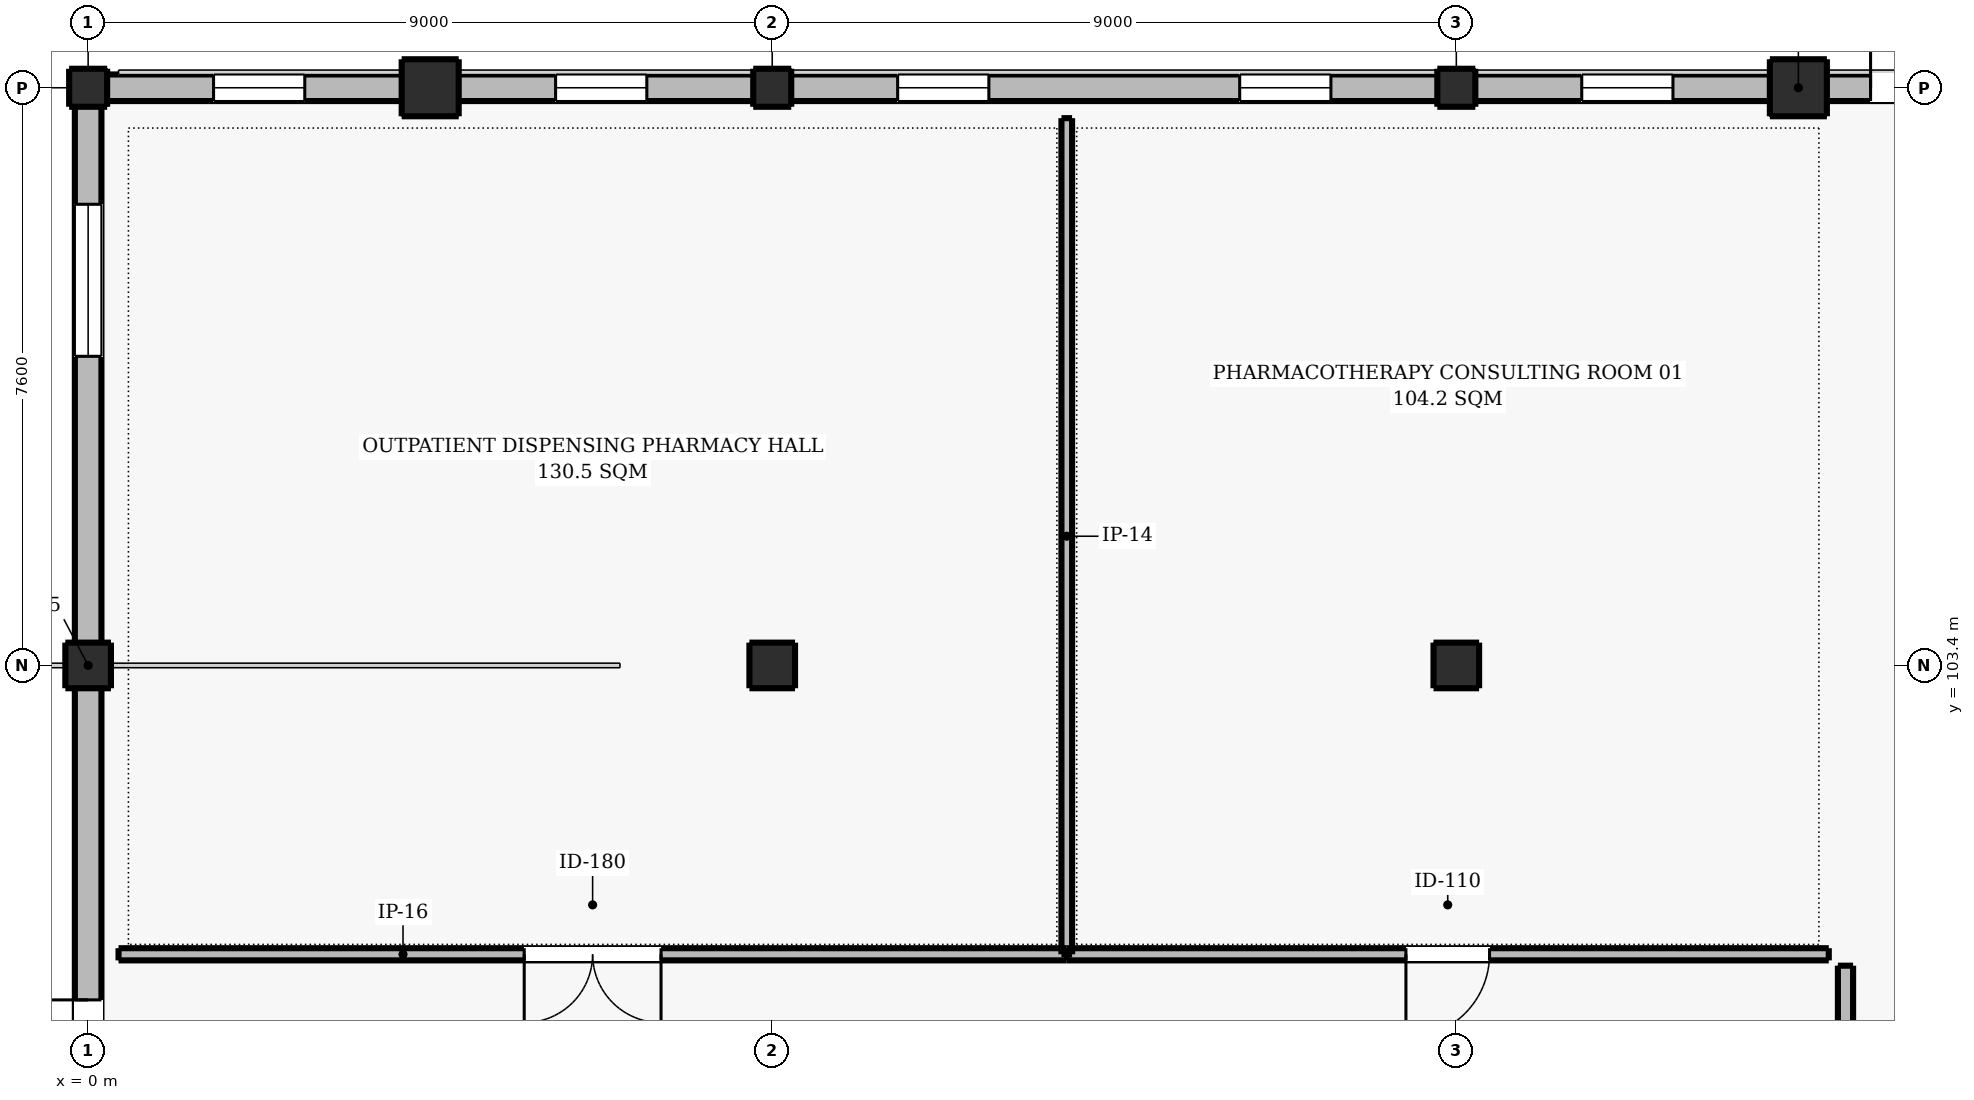
"""IFC4 building model, lengths in metres.
Left out: names, types, materials, properties, quantities, classifications, styles, units other than length and angle.
Written with IfcOpenShell. Run it as: python <this file> out.ifc"""

import sys

from ifc_helpers import new_model, si_unit, direction, frame, frame_2d, origin, origin_2d, place, context, subcontext, project, spatial, rectangle, circle, extrude, element, fill, save


model = new_model("IFC4")
c1 = context("Model", 3, precision=1e-05, world=origin(), true_north=direction((0.0, 1.0)))
c2 = subcontext(c1, "Body", "Model", "MODEL_VIEW")
j1 = project(units=[si_unit("LENGTHUNIT", "METRE"), si_unit("PLANEANGLEUNIT", "RADIAN")], contexts=[c1])
p1 = place(None, origin())
s1 = spatial("IfcSite", under=j1, at=p1, CompositionType="ELEMENT")
p2 = place(p1, origin())
s2 = spatial("IfcBuilding", under=s1, at=p2, CompositionType="ELEMENT")
p3 = place(p2, origin())
s3 = spatial("IfcBuildingStorey", under=s2, at=p3, CompositionType="ELEMENT", Elevation=0.0)
p4 = place(p3, frame((0.0, 103.4, 0.0), z_axis=(0.0, 0.0, 1.0), x_axis=(1.0, 0.0, 0.0)))
e1 = element("IfcColumn", 1, at=p4, inside=s3, PredefinedType="COLUMN", context=c2, shape_type="SweptSolid", body=[
    extrude(rectangle(XDim=0.6, YDim=0.6, at=origin_2d()), origin(), (0.0, 0.0, 1.0), 5.1),
])
p5 = place(p3, frame((0.0, 111.0, 0.0), z_axis=(0.0, 0.0, 1.0), x_axis=(1.0, 0.0, 0.0)))
e2 = element("IfcColumn", 2, at=p5, inside=s3, PredefinedType="COLUMN", context=c2, shape_type="SweptSolid", body=[
    extrude(circle(Radius=0.35, at=origin_2d()), origin(), (0.0, 0.0, 1.0), 5.1),
])
p6 = place(p3, frame((4.5, 111.0, 0.0), z_axis=(0.0, 0.0, 1.0), x_axis=(1.0, 0.0, 0.0)))
e3 = element("IfcColumn", 3, at=p6, inside=s3, PredefinedType="PILASTER", context=c2, shape_type="SweptSolid", body=[
    extrude(rectangle(XDim=0.75, YDim=0.75, at=origin_2d()), origin(), (0.0, 0.0, 1.0), 5.1),
])
p7 = place(p3, frame((9.0, 103.4, 0.0), z_axis=(0.0, 0.0, 1.0), x_axis=(1.0, 0.0, 0.0)))
e4 = element("IfcColumn", 4, at=p7, inside=s3, PredefinedType="COLUMN", context=c2, shape_type="SweptSolid", body=[
    extrude(rectangle(XDim=0.6, YDim=0.6, at=origin_2d()), origin(), (0.0, 0.0, 1.0), 5.1),
])
p8 = place(p3, frame((9.0, 111.0, 0.0), z_axis=(0.0, 0.0, 1.0), x_axis=(1.0, 0.0, 0.0)))
e5 = element("IfcColumn", 5, at=p8, inside=s3, PredefinedType="COLUMN", context=c2, shape_type="SweptSolid", body=[
    extrude(circle(Radius=0.35, at=origin_2d()), origin(), (0.0, 0.0, 1.0), 5.1),
])
p9 = place(p3, frame((18.0, 103.4, 0.0), z_axis=(0.0, 0.0, 1.0), x_axis=(1.0, 0.0, 0.0)))
e6 = element("IfcColumn", 6, at=p9, inside=s3, PredefinedType="COLUMN", context=c2, shape_type="SweptSolid", body=[
    extrude(rectangle(XDim=0.6, YDim=0.6, at=origin_2d()), origin(), (0.0, 0.0, 1.0), 5.1),
])
p10 = place(p3, frame((18.0, 111.0, 0.0), z_axis=(0.0, 0.0, 1.0), x_axis=(1.0, 0.0, 0.0)))
e7 = element("IfcColumn", 7, at=p10, inside=s3, PredefinedType="COLUMN", context=c2, shape_type="SweptSolid", body=[
    extrude(circle(Radius=0.35, at=origin_2d()), origin(), (0.0, 0.0, 1.0), 5.1),
])
p11 = place(p3, frame((22.5, 111.0, 0.0), z_axis=(0.0, 0.0, 1.0), x_axis=(1.0, 0.0, 0.0)))
e8 = element("IfcColumn", 8, at=p11, inside=s3, PredefinedType="PILASTER", context=c2, shape_type="SweptSolid", body=[
    extrude(rectangle(XDim=0.75, YDim=0.75, at=origin_2d()), origin(), (0.0, 0.0, 1.0), 5.1),
])
p12 = place(p3, frame((0.0, 95.8, 0.0), z_axis=(0.0, 0.0, 1.0), x_axis=(0.0, 1.0, 0.0)))
e9 = element("IfcWall", 9, at=p12, inside=s3, PredefinedType="SOLIDWALL", context=c2, shape_type="SweptSolid", body=[
    extrude(rectangle(XDim=15.2, YDim=0.35, at=frame_2d((7.6, 0.0))), origin(), (0.0, 0.0, 1.0), 4.16),
])
p13 = place(p12, frame((0.8, 0.0, 0.0)))
e10 = element("IfcOpeningElement", 10, at=p13, cuts=e9, PredefinedType="OPENING", context=c2, shape_type="SweptSolid", body=[
    extrude(rectangle(XDim=2.4, YDim=2.5, at=frame_2d((1.2, 1.25))), frame((0.0, 0.185, 0.0), z_axis=(0.0, -1.0, 0.0), x_axis=(1.0, 0.0, 0.0)), (0.0, 0.0, 1.0), 0.37),
])
p14 = place(p12, frame((11.667, 0.0, 1.05)))
e11 = element("IfcOpeningElement", 11, at=p14, cuts=e9, PredefinedType="OPENING", context=c2, shape_type="SweptSolid", body=[
    extrude(rectangle(XDim=2.0, YDim=2.1, at=frame_2d((1.0, 1.05))), frame((0.0, 0.185, 0.0), z_axis=(0.0, -1.0, 0.0), x_axis=(1.0, 0.0, 0.0)), (0.0, 0.0, 1.0), 0.37),
])
p15 = place(p3, frame((0.0, 111.0, 0.0), z_axis=(0.0, 0.0, 1.0), x_axis=(1.0, 0.0, 0.0)))
e12 = element("IfcWall", 12, at=p15, inside=s3, PredefinedType="SOLIDWALL", context=c2, shape_type="SweptSolid", body=[
    extrude(rectangle(XDim=45.0, YDim=0.35, at=frame_2d((22.5, 0.0))), origin(), (0.0, 0.0, 1.0), 4.01),
])
p16 = place(p15, frame((23.45, 0.0, 0.0)))
e13 = element("IfcOpeningElement", 13, at=p16, cuts=e12, PredefinedType="OPENING", context=c2, shape_type="SweptSolid", body=[
    extrude(rectangle(XDim=2.6, YDim=2.6, at=frame_2d((1.3, 1.3))), frame((0.0, 0.185, 0.0), z_axis=(0.0, -1.0, 0.0), x_axis=(1.0, 0.0, 0.0)), (0.0, 0.0, 1.0), 0.37),
])
p17 = place(p15, frame((30.2, 0.0, 0.0)))
e14 = element("IfcOpeningElement", 14, at=p17, cuts=e12, PredefinedType="OPENING", context=c2, shape_type="SweptSolid", body=[
    extrude(rectangle(XDim=2.6, YDim=2.6, at=frame_2d((1.3, 1.3))), frame((0.0, 0.185, 0.0), z_axis=(0.0, -1.0, 0.0), x_axis=(1.0, 0.0, 0.0)), (0.0, 0.0, 1.0), 0.37),
])
p18 = place(p15, frame((1.65, 0.0, 1.05)))
e15 = element("IfcOpeningElement", 15, at=p18, cuts=e12, PredefinedType="OPENING", context=c2, shape_type="SweptSolid", body=[
    extrude(rectangle(XDim=1.2, YDim=1.5, at=frame_2d((0.6, 0.75))), frame((0.0, 0.185, 0.0), z_axis=(0.0, -1.0, 0.0), x_axis=(1.0, 0.0, 0.0)), (0.0, 0.0, 1.0), 0.37),
])
p19 = place(p15, frame((6.15, 0.0, 1.05)))
e16 = element("IfcOpeningElement", 16, at=p19, cuts=e12, PredefinedType="OPENING", context=c2, shape_type="SweptSolid", body=[
    extrude(rectangle(XDim=1.2, YDim=1.5, at=frame_2d((0.6, 0.75))), frame((0.0, 0.185, 0.0), z_axis=(0.0, -1.0, 0.0), x_axis=(1.0, 0.0, 0.0)), (0.0, 0.0, 1.0), 0.37),
])
p20 = place(p15, frame((10.65, 0.0, 1.05)))
e17 = element("IfcOpeningElement", 17, at=p20, cuts=e12, PredefinedType="OPENING", context=c2, shape_type="SweptSolid", body=[
    extrude(rectangle(XDim=1.2, YDim=1.5, at=frame_2d((0.6, 0.75))), frame((0.0, 0.185, 0.0), z_axis=(0.0, -1.0, 0.0), x_axis=(1.0, 0.0, 0.0)), (0.0, 0.0, 1.0), 0.37),
])
p21 = place(p15, frame((15.15, 0.0, 1.05)))
e18 = element("IfcOpeningElement", 18, at=p21, cuts=e12, PredefinedType="OPENING", context=c2, shape_type="SweptSolid", body=[
    extrude(rectangle(XDim=1.2, YDim=1.5, at=frame_2d((0.6, 0.75))), frame((0.0, 0.185, 0.0), z_axis=(0.0, -1.0, 0.0), x_axis=(1.0, 0.0, 0.0)), (0.0, 0.0, 1.0), 0.37),
])
p22 = place(p15, frame((19.65, 0.0, 1.05)))
e19 = element("IfcOpeningElement", 19, at=p22, cuts=e12, PredefinedType="OPENING", context=c2, shape_type="SweptSolid", body=[
    extrude(rectangle(XDim=1.2, YDim=1.5, at=frame_2d((0.6, 0.75))), frame((0.0, 0.185, 0.0), z_axis=(0.0, -1.0, 0.0), x_axis=(1.0, 0.0, 0.0)), (0.0, 0.0, 1.0), 0.37),
])
p23 = place(p15, frame((37.65, 0.0, 1.05)))
e20 = element("IfcOpeningElement", 20, at=p23, cuts=e12, PredefinedType="OPENING", context=c2, shape_type="SweptSolid", body=[
    extrude(rectangle(XDim=1.2, YDim=1.5, at=frame_2d((0.6, 0.75))), frame((0.0, 0.185, 0.0), z_axis=(0.0, -1.0, 0.0), x_axis=(1.0, 0.0, 0.0)), (0.0, 0.0, 1.0), 0.37),
])
p24 = place(p15, frame((42.15, 0.0, 1.05)))
e21 = element("IfcOpeningElement", 21, at=p24, cuts=e12, PredefinedType="OPENING", context=c2, shape_type="SweptSolid", body=[
    extrude(rectangle(XDim=1.2, YDim=1.5, at=frame_2d((0.6, 0.75))), frame((0.0, 0.185, 0.0), z_axis=(0.0, -1.0, 0.0), x_axis=(1.0, 0.0, 0.0)), (0.0, 0.0, 1.0), 0.37),
])
p25 = place(p3, frame((23.12, 96.0, 0.0), z_axis=(0.0, 0.0, 1.0), x_axis=(0.0, 1.0, 0.0)))
e22 = element("IfcWall", 22, at=p25, inside=s3, PredefinedType="PARTITIONING", context=c2, shape_type="SweptSolid", body=[
    extrude(rectangle(XDim=3.45, YDim=0.2, at=frame_2d((1.725, 0.0))), origin(), (0.0, 0.0, 1.0), 4.82),
])
p26 = place(p25, frame((1.175, 0.0, 0.0)))
e23 = element("IfcOpeningElement", 23, at=p26, cuts=e22, PredefinedType="OPENING", context=c2, shape_type="SweptSolid", body=[
    extrude(rectangle(XDim=1.12, YDim=2.15, at=frame_2d((0.56, 1.075))), frame((0.0, 0.11, 0.0), z_axis=(0.0, -1.0, 0.0), x_axis=(1.0, 0.0, 0.0)), (0.0, 0.0, 1.0), 0.22),
])
p27 = place(p3, frame((0.4, 99.6, 0.0), z_axis=(0.0, 0.0, 1.0), x_axis=(1.0, 0.0, 0.0)))
e24 = element("IfcWall", 24, at=p27, inside=s3, PredefinedType="PARTITIONING", context=c2, shape_type="SweptSolid", body=[
    extrude(rectangle(XDim=12.475, YDim=0.16, at=frame_2d((6.238, 0.0))), origin(), (0.0, 0.0, 1.0), 4.82),
])
p28 = place(p27, frame((5.337, 0.0, 0.0)))
e25 = element("IfcOpeningElement", 25, at=p28, cuts=e24, PredefinedType="OPENING", context=c2, shape_type="SweptSolid", body=[
    extrude(rectangle(XDim=1.8, YDim=2.25, at=frame_2d((0.9, 1.125))), frame((0.0, 0.09, 0.0), z_axis=(0.0, -1.0, 0.0), x_axis=(1.0, 0.0, 0.0)), (0.0, 0.0, 1.0), 0.18),
])
p29 = place(p3, frame((12.875, 99.6, 0.0), z_axis=(0.0, 0.0, 1.0), x_axis=(0.0, 1.0, 0.0)))
e26 = element("IfcWall", 26, at=p29, inside=s3, PredefinedType="PARTITIONING", context=c2, shape_type="SweptSolid", body=[
    extrude(rectangle(XDim=11.0, YDim=0.14, at=frame_2d((5.5, 0.0))), origin(), (0.0, 0.0, 1.0), 4.82),
])
p30 = place(p3, frame((12.875, 99.6, 0.0), z_axis=(0.0, 0.0, 1.0), x_axis=(1.0, 0.0, 0.0)))
e27 = element("IfcWall", 27, at=p30, inside=s3, PredefinedType="PARTITIONING", context=c2, shape_type="SweptSolid", body=[
    extrude(rectangle(XDim=10.025, YDim=0.16, at=frame_2d((5.012, 0.0))), origin(), (0.0, 0.0, 1.0), 4.82),
])
p31 = place(p30, frame((4.462, 0.0, 0.0)))
e28 = element("IfcOpeningElement", 28, at=p31, cuts=e27, PredefinedType="OPENING", context=c2, shape_type="SweptSolid", body=[
    extrude(rectangle(XDim=1.1, YDim=2.15, at=frame_2d((0.55, 1.075))), frame((0.0, 0.09, 0.0), z_axis=(0.0, -1.0, 0.0), x_axis=(1.0, 0.0, 0.0)), (0.0, 0.0, 1.0), 0.18),
])
p32 = place(p13, origin())
e29 = element("IfcDoor", 29, at=p32, inside=s3, OperationType="DOUBLE_DOOR_SINGLE_SWING", PredefinedType="DOOR", context=c2, shape_type="SweptSolid", body=[
    extrude(rectangle(XDim=2.4, YDim=2.5, at=frame_2d((1.2, 1.25))), frame((0.0, 0.025, 0.0), z_axis=(0.0, -1.0, 0.0), x_axis=(1.0, 0.0, 0.0)), (0.0, 0.0, 1.0), 0.05),
])
fill(e10, e29)
p33 = place(p16, origin())
e30 = element("IfcDoor", 30, at=p33, inside=s3, OperationType="DOUBLE_DOOR_SINGLE_SWING", PredefinedType="DOOR", context=c2, shape_type="SweptSolid", body=[
    extrude(rectangle(XDim=2.6, YDim=2.6, at=frame_2d((1.3, 1.3))), frame((0.0, 0.025, 0.0), z_axis=(0.0, -1.0, 0.0), x_axis=(1.0, 0.0, 0.0)), (0.0, 0.0, 1.0), 0.05),
])
fill(e13, e30)
p34 = place(p14, origin())
e31 = element("IfcWindow", 31, at=p34, inside=s3, PartitioningType="SINGLE_PANEL", PredefinedType="WINDOW", context=c2, shape_type="SweptSolid", body=[
    extrude(rectangle(XDim=2.0, YDim=2.1, at=frame_2d((1.0, 1.05))), frame((0.0, 0.03, 0.0), z_axis=(0.0, -1.0, 0.0), x_axis=(1.0, 0.0, 0.0)), (0.0, 0.0, 1.0), 0.06),
])
fill(e11, e31)
p35 = place(p18, origin())
e32 = element("IfcWindow", 32, at=p35, inside=s3, PartitioningType="SINGLE_PANEL", PredefinedType="WINDOW", context=c2, shape_type="SweptSolid", body=[
    extrude(rectangle(XDim=1.2, YDim=1.5, at=frame_2d((0.6, 0.75))), frame((0.0, 0.03, 0.0), z_axis=(0.0, -1.0, 0.0), x_axis=(1.0, 0.0, 0.0)), (0.0, 0.0, 1.0), 0.06),
])
fill(e15, e32)
p36 = place(p19, origin())
e33 = element("IfcWindow", 33, at=p36, inside=s3, PartitioningType="SINGLE_PANEL", PredefinedType="WINDOW", context=c2, shape_type="SweptSolid", body=[
    extrude(rectangle(XDim=1.2, YDim=1.5, at=frame_2d((0.6, 0.75))), frame((0.0, 0.03, 0.0), z_axis=(0.0, -1.0, 0.0), x_axis=(1.0, 0.0, 0.0)), (0.0, 0.0, 1.0), 0.06),
])
fill(e16, e33)
p37 = place(p20, origin())
e34 = element("IfcWindow", 34, at=p37, inside=s3, PartitioningType="SINGLE_PANEL", PredefinedType="WINDOW", context=c2, shape_type="SweptSolid", body=[
    extrude(rectangle(XDim=1.2, YDim=1.5, at=frame_2d((0.6, 0.75))), frame((0.0, 0.03, 0.0), z_axis=(0.0, -1.0, 0.0), x_axis=(1.0, 0.0, 0.0)), (0.0, 0.0, 1.0), 0.06),
])
fill(e17, e34)
p38 = place(p21, origin())
e35 = element("IfcWindow", 35, at=p38, inside=s3, PartitioningType="SINGLE_PANEL", PredefinedType="WINDOW", context=c2, shape_type="SweptSolid", body=[
    extrude(rectangle(XDim=1.2, YDim=1.5, at=frame_2d((0.6, 0.75))), frame((0.0, 0.03, 0.0), z_axis=(0.0, -1.0, 0.0), x_axis=(1.0, 0.0, 0.0)), (0.0, 0.0, 1.0), 0.06),
])
fill(e18, e35)
p39 = place(p22, origin())
e36 = element("IfcWindow", 36, at=p39, inside=s3, PartitioningType="SINGLE_PANEL", PredefinedType="WINDOW", context=c2, shape_type="SweptSolid", body=[
    extrude(rectangle(XDim=1.2, YDim=1.5, at=frame_2d((0.6, 0.75))), frame((0.0, 0.03, 0.0), z_axis=(0.0, -1.0, 0.0), x_axis=(1.0, 0.0, 0.0)), (0.0, 0.0, 1.0), 0.06),
])
fill(e19, e36)
p40 = place(p28, frame((1.8, 0.0, 0.0), z_axis=(0.0, 0.0, 1.0), x_axis=(-1.0, 0.0, 0.0)))
e37 = element("IfcDoor", 37, at=p40, inside=s3, OperationType="DOUBLE_DOOR_SINGLE_SWING", PredefinedType="DOOR", context=c2, shape_type="SweptSolid", body=[
    extrude(rectangle(XDim=1.8, YDim=2.25, at=frame_2d((0.9, 1.125))), frame((0.0, 0.025, 0.0), z_axis=(0.0, -1.0, 0.0), x_axis=(1.0, 0.0, 0.0)), (0.0, 0.0, 1.0), 0.05),
])
fill(e25, e37)
p41 = place(p31, frame((1.1, 0.0, 0.0), z_axis=(0.0, 0.0, 1.0), x_axis=(-1.0, 0.0, 0.0)))
e38 = element("IfcDoor", 38, at=p41, inside=s3, OperationType="SINGLE_SWING_LEFT", PredefinedType="DOOR", context=c2, shape_type="SweptSolid", body=[
    extrude(rectangle(XDim=1.1, YDim=2.15, at=frame_2d((0.55, 1.075))), frame((0.0, 0.025, 0.0), z_axis=(0.0, -1.0, 0.0), x_axis=(1.0, 0.0, 0.0)), (0.0, 0.0, 1.0), 0.05),
])
fill(e28, e38)
save(model, sys.argv[1])
